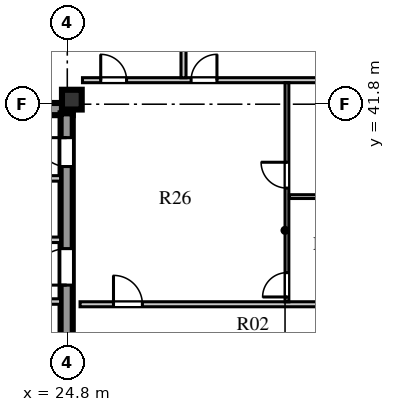
"""IFC4 building model, lengths in metres.
Left out: names, types, materials, properties, quantities, classifications, styles, units other than length and angle.
Written with IfcOpenShell. Run it as: python <this file> out.ifc"""

import sys

from ifc_helpers import new_model, si_unit, direction, frame, frame_2d, origin, origin_2d, place, context, subcontext, project, spatial, rectangle, extrude, element, fill, save


model = new_model("IFC4")
c1 = context("Model", 3, precision=1e-05, world=origin(), true_north=direction((0.0, 1.0)))
c2 = subcontext(c1, "Body", "Model", "MODEL_VIEW")
j1 = project(units=[si_unit("LENGTHUNIT", "METRE"), si_unit("PLANEANGLEUNIT", "RADIAN")], contexts=[c1])
p1 = place(None, origin())
s1 = spatial("IfcSite", under=j1, at=p1, CompositionType="ELEMENT")
p2 = place(p1, origin())
s2 = spatial("IfcBuilding", under=s1, at=p2, CompositionType="ELEMENT")
p3 = place(p2, frame((0.0, 0.0, 253.1)))
s3 = spatial("IfcBuildingStorey", under=s2, at=p3, CompositionType="ELEMENT", Elevation=253.1)
p4 = place(p3, frame((15.5, 41.64, 0.0), z_axis=(0.0, 0.0, 1.0), x_axis=(1.0, 0.0, 0.0)))
e1 = element("IfcWall", 1, at=p4, inside=s3, PredefinedType="SHEAR", context=c2, shape_type="SweptSolid", body=[
    extrude(rectangle(XDim=9.48, YDim=0.4, at=frame_2d((4.74, 0.0))), origin(), (0.0, 0.0, 1.0), 3.66),
])
p5 = place(p3, frame((24.78, 15.74, 0.0), z_axis=(0.0, 0.0, 1.0), x_axis=(0.0, 1.0, 0.0)))
e2 = element("IfcWall", 2, at=p5, inside=s3, PredefinedType="SHEAR", context=c2, shape_type="SweptSolid", body=[
    extrude(rectangle(XDim=25.76, YDim=0.4, at=frame_2d((12.88, 0.0))), origin(), (0.0, 0.0, 1.0), 3.66),
])
p6 = place(p5, frame((1.61, 0.0, 0.0)))
e3 = element("IfcOpeningElement", 3, at=p6, cuts=e2, PredefinedType="OPENING", context=c2, shape_type="SweptSolid", body=[
    extrude(rectangle(XDim=1.2, YDim=2.1, at=frame_2d((0.6, 1.05))), frame((0.0, 0.21, 0.0), z_axis=(0.0, -1.0, 0.0), x_axis=(1.0, 0.0, 0.0)), (0.0, 0.0, 1.0), 0.42),
])
p7 = place(p5, frame((6.78, 0.0, 0.0)))
e4 = element("IfcOpeningElement", 4, at=p7, cuts=e2, PredefinedType="OPENING", context=c2, shape_type="SweptSolid", body=[
    extrude(rectangle(XDim=0.85, YDim=2.06, at=frame_2d((0.425, 1.03))), frame((0.0, 0.21, 0.0), z_axis=(0.0, -1.0, 0.0), x_axis=(1.0, 0.0, 0.0)), (0.0, 0.0, 1.0), 0.42),
])
p8 = place(p5, frame((12.11, 0.0, 0.0)))
e5 = element("IfcOpeningElement", 5, at=p8, cuts=e2, PredefinedType="OPENING", context=c2, shape_type="SweptSolid", body=[
    extrude(rectangle(XDim=1.5, YDim=2.12, at=frame_2d((0.75, 1.06))), frame((0.0, 0.21, 0.0), z_axis=(0.0, -1.0, 0.0), x_axis=(1.0, 0.0, 0.0)), (0.0, 0.0, 1.0), 0.42),
])
p9 = place(p5, frame((20.11, 0.0, 0.0)))
e6 = element("IfcOpeningElement", 6, at=p9, cuts=e2, PredefinedType="OPENING", context=c2, shape_type="SweptSolid", body=[
    extrude(rectangle(XDim=1.2, YDim=2.12, at=frame_2d((0.6, 1.06))), frame((0.0, 0.21, 0.0), z_axis=(0.0, -1.0, 0.0), x_axis=(1.0, 0.0, 0.0)), (0.0, 0.0, 1.0), 0.42),
])
p10 = place(p5, frame((24.01, 0.0, 0.0)))
e7 = element("IfcOpeningElement", 7, at=p10, cuts=e2, PredefinedType="OPENING", context=c2, shape_type="SweptSolid", body=[
    extrude(rectangle(XDim=0.95, YDim=2.1, at=frame_2d((0.475, 1.05))), frame((0.0, 0.21, 0.0), z_axis=(0.0, -1.0, 0.0), x_axis=(1.0, 0.0, 0.0)), (0.0, 0.0, 1.0), 0.42),
])
p11 = place(p3, frame((24.95, 41.95, 0.0), z_axis=(0.0, 0.0, 1.0), x_axis=(1.0, 0.0, 0.0)))
e8 = element("IfcColumn", 8, at=p11, inside=s3, PredefinedType="COLUMN", context=c2, shape_type="SweptSolid", body=[
    extrude(rectangle(XDim=0.65, YDim=0.65, at=origin_2d()), origin(), (0.0, 0.0, 1.0), 3.66),
])
p12 = place(p3, frame((22.02, 35.31, 0.0), z_axis=(0.0, 0.0, 1.0), x_axis=(1.0, 0.0, 0.0)))
e9 = element("IfcWall", 9, at=p12, inside=s3, PredefinedType="SOLIDWALL", context=c2, shape_type="SweptSolid", body=[
    extrude(rectangle(XDim=2.56, YDim=0.18, at=frame_2d((1.28, 0.0))), origin(), (0.0, 0.0, 1.0), 3.66),
])
p13 = place(p12, frame((0.55, 0.0, 0.0)))
e10 = element("IfcOpeningElement", 10, at=p13, cuts=e9, PredefinedType="OPENING", context=c2, shape_type="SweptSolid", body=[
    extrude(rectangle(XDim=1.0, YDim=2.1, at=frame_2d((0.5, 1.05))), frame((0.0, 0.1, 0.0), z_axis=(0.0, -1.0, 0.0), x_axis=(1.0, 0.0, 0.0)), (0.0, 0.0, 1.0), 0.2),
])
p14 = place(p3, frame((19.64, 37.34, 0.0), z_axis=(0.0, 0.0, 1.0), x_axis=(1.0, 0.0, 0.0)))
e11 = element("IfcWall", 11, at=p14, inside=s3, PredefinedType="SOLIDWALL", context=c2, shape_type="SweptSolid", body=[
    extrude(rectangle(XDim=4.94, YDim=0.18, at=frame_2d((2.47, 0.0))), origin(), (0.0, 0.0, 1.0), 3.66),
])
p15 = place(p14, frame((0.45, 0.0, 0.0)))
e12 = element("IfcOpeningElement", 12, at=p15, cuts=e11, PredefinedType="OPENING", context=c2, shape_type="SweptSolid", body=[
    extrude(rectangle(XDim=1.0, YDim=2.1, at=frame_2d((0.5, 1.05))), frame((0.0, 0.1, 0.0), z_axis=(0.0, -1.0, 0.0), x_axis=(1.0, 0.0, 0.0)), (0.0, 0.0, 1.0), 0.2),
])
p16 = place(p14, frame((2.5, 0.0, 0.0)))
e13 = element("IfcOpeningElement", 13, at=p16, cuts=e11, PredefinedType="OPENING", context=c2, shape_type="SweptSolid", body=[
    extrude(rectangle(XDim=1.0, YDim=2.1, at=frame_2d((0.5, 1.05))), frame((0.0, 0.1, 0.0), z_axis=(0.0, -1.0, 0.0), x_axis=(1.0, 0.0, 0.0)), (0.0, 0.0, 1.0), 0.2),
])
p17 = place(p3, frame((19.64, 39.36, 0.0), z_axis=(0.0, 0.0, 1.0), x_axis=(1.0, 0.0, 0.0)))
e14 = element("IfcWall", 14, at=p17, inside=s3, PredefinedType="SOLIDWALL", context=c2, shape_type="SweptSolid", body=[
    extrude(rectangle(XDim=4.94, YDim=0.18, at=frame_2d((2.47, 0.0))), origin(), (0.0, 0.0, 1.0), 3.66),
])
p18 = place(p3, frame((25.22, 35.22, 0.0), z_axis=(0.0, 0.0, 1.0), x_axis=(1.0, 0.0, 0.0)))
e15 = element("IfcWall", 15, at=p18, inside=s3, PredefinedType="PARTITIONING", context=c2, shape_type="SweptSolid", body=[
    extrude(rectangle(XDim=9.5, YDim=0.165, at=frame_2d((4.75, 0.0))), origin(), (0.0, 0.0, 1.0), 3.66),
])
p19 = place(p18, frame((1.1, 0.0, 0.0)))
e16 = element("IfcOpeningElement", 16, at=p19, cuts=e15, PredefinedType="OPENING", context=c2, shape_type="SweptSolid", body=[
    extrude(rectangle(XDim=0.95, YDim=2.1, at=frame_2d((0.475, 1.05))), frame((0.0, 0.093, 0.0), z_axis=(0.0, -1.0, 0.0), x_axis=(1.0, 0.0, 0.0)), (0.0, 0.0, 1.0), 0.185),
])
p20 = place(p3, frame((25.3, 42.59, 0.0), z_axis=(0.0, 0.0, 1.0), x_axis=(1.0, 0.0, 0.0)))
e17 = element("IfcWall", 17, at=p20, inside=s3, PredefinedType="PARTITIONING", context=c2, shape_type="SweptSolid", body=[
    extrude(rectangle(XDim=9.34, YDim=0.165, at=frame_2d((4.67, 0.0))), origin(), (0.0, 0.0, 1.0), 3.66),
])
p21 = place(p20, frame((0.6, 0.0, 0.0)))
e18 = element("IfcOpeningElement", 18, at=p21, cuts=e17, PredefinedType="OPENING", context=c2, shape_type="SweptSolid", body=[
    extrude(rectangle(XDim=0.85, YDim=2.08, at=frame_2d((0.425, 1.04))), frame((0.0, 0.093, 0.0), z_axis=(0.0, -1.0, 0.0), x_axis=(1.0, 0.0, 0.0)), (0.0, 0.0, 1.0), 0.185),
])
p22 = place(p20, frame((3.573, 0.0, 0.0)))
e19 = element("IfcOpeningElement", 19, at=p22, cuts=e17, PredefinedType="OPENING", context=c2, shape_type="SweptSolid", body=[
    extrude(rectangle(XDim=0.85, YDim=2.08, at=frame_2d((0.425, 1.04))), frame((0.0, 0.093, 0.0), z_axis=(0.0, -1.0, 0.0), x_axis=(1.0, 0.0, 0.0)), (0.0, 0.0, 1.0), 0.185),
])
p23 = place(p3, frame((32.025, 35.3, 0.0), z_axis=(0.0, 0.0, 1.0), x_axis=(0.0, 1.0, 0.0)))
e20 = element("IfcWall", 20, at=p23, inside=s3, PredefinedType="PLUMBINGWALL", context=c2, shape_type="SweptSolid", body=[
    extrude(rectangle(XDim=7.21, YDim=0.125, at=frame_2d((3.605, 0.0))), origin(), (0.0, 0.0, 1.0), 3.66),
])
p24 = place(p23, frame((0.16, 0.0, 0.0)))
e21 = element("IfcOpeningElement", 21, at=p24, cuts=e20, PredefinedType="OPENING", context=c2, shape_type="SweptSolid", body=[
    extrude(rectangle(XDim=0.8, YDim=2.05, at=frame_2d((0.4, 1.025))), frame((0.0, 0.073, 0.0), z_axis=(0.0, -1.0, 0.0), x_axis=(1.0, 0.0, 0.0)), (0.0, 0.0, 1.0), 0.145),
])
p25 = place(p23, frame((3.741, 0.0, 0.0)))
e22 = element("IfcOpeningElement", 22, at=p25, cuts=e20, PredefinedType="OPENING", context=c2, shape_type="SweptSolid", body=[
    extrude(rectangle(XDim=0.85, YDim=2.08, at=frame_2d((0.425, 1.04))), frame((0.0, 0.073, 0.0), z_axis=(0.0, -1.0, 0.0), x_axis=(1.0, 0.0, 0.0)), (0.0, 0.0, 1.0), 0.145),
])
p26 = place(p3, frame((32.105, 38.761, 0.0), z_axis=(0.0, 0.0, 1.0), x_axis=(1.0, 0.0, 0.0)))
e23 = element("IfcWall", 23, at=p26, inside=s3, PredefinedType="PLUMBINGWALL", context=c2, shape_type="SweptSolid", body=[
    extrude(rectangle(XDim=2.535, YDim=0.125, at=frame_2d((1.268, 0.0))), origin(), (0.0, 0.0, 1.0), 3.66),
])
p27 = place(p3, frame((28.623, 42.67, 0.0), z_axis=(0.0, 0.0, 1.0), x_axis=(0.0, 1.0, 0.0)))
e24 = element("IfcWall", 24, at=p27, inside=s3, PredefinedType="PARTITIONING", context=c2, shape_type="SweptSolid", body=[
    extrude(rectangle(XDim=6.65, YDim=0.165, at=frame_2d((3.325, 0.0))), origin(), (0.0, 0.0, 1.0), 3.66),
])
p28 = place(p9, frame((1.2, 0.0, 0.0), z_axis=(0.0, 0.0, 1.0), x_axis=(-1.0, 0.0, 0.0)))
e25 = element("IfcDoor", 25, at=p28, inside=s3, OperationType="SINGLE_SWING_RIGHT", PredefinedType="DOOR", context=c2, shape_type="SweptSolid", body=[
    extrude(rectangle(XDim=1.2, YDim=2.12, at=frame_2d((0.6, 1.06))), frame((0.0, 0.025, 0.0), z_axis=(0.0, -1.0, 0.0), x_axis=(1.0, 0.0, 0.0)), (0.0, 0.0, 1.0), 0.05),
])
fill(e6, e25)
p29 = place(p10, frame((0.95, 0.0, 0.0), z_axis=(0.0, 0.0, 1.0), x_axis=(-1.0, 0.0, 0.0)))
e26 = element("IfcDoor", 26, at=p29, inside=s3, OperationType="SINGLE_SWING_LEFT", PredefinedType="DOOR", context=c2, shape_type="SweptSolid", body=[
    extrude(rectangle(XDim=0.95, YDim=2.1, at=frame_2d((0.475, 1.05))), frame((0.0, 0.025, 0.0), z_axis=(0.0, -1.0, 0.0), x_axis=(1.0, 0.0, 0.0)), (0.0, 0.0, 1.0), 0.05),
])
fill(e7, e26)
p30 = place(p24, origin())
e27 = element("IfcDoor", 27, at=p30, inside=s3, OperationType="SINGLE_SWING_LEFT", PredefinedType="DOOR", context=c2, shape_type="SweptSolid", body=[
    extrude(rectangle(XDim=0.8, YDim=2.05, at=frame_2d((0.4, 1.025))), frame((0.0, 0.025, 0.0), z_axis=(0.0, -1.0, 0.0), x_axis=(1.0, 0.0, 0.0)), (0.0, 0.0, 1.0), 0.05),
])
fill(e21, e27)
p31 = place(p25, origin())
e28 = element("IfcDoor", 28, at=p31, inside=s3, OperationType="SINGLE_SWING_RIGHT", PredefinedType="DOOR", context=c2, shape_type="SweptSolid", body=[
    extrude(rectangle(XDim=0.85, YDim=2.08, at=frame_2d((0.425, 1.04))), frame((0.0, 0.025, 0.0), z_axis=(0.0, -1.0, 0.0), x_axis=(1.0, 0.0, 0.0)), (0.0, 0.0, 1.0), 0.05),
])
fill(e22, e28)
p32 = place(p21, origin())
e29 = element("IfcDoor", 29, at=p32, inside=s3, OperationType="SINGLE_SWING_LEFT", PredefinedType="DOOR", context=c2, shape_type="SweptSolid", body=[
    extrude(rectangle(XDim=0.85, YDim=2.08, at=frame_2d((0.425, 1.04))), frame((0.0, 0.025, 0.0), z_axis=(0.0, -1.0, 0.0), x_axis=(1.0, 0.0, 0.0)), (0.0, 0.0, 1.0), 0.05),
])
fill(e18, e29)
p33 = place(p22, origin())
e30 = element("IfcDoor", 30, at=p33, inside=s3, OperationType="SINGLE_SWING_RIGHT", PredefinedType="DOOR", context=c2, shape_type="SweptSolid", body=[
    extrude(rectangle(XDim=0.85, YDim=2.08, at=frame_2d((0.425, 1.04))), frame((0.0, 0.025, 0.0), z_axis=(0.0, -1.0, 0.0), x_axis=(1.0, 0.0, 0.0)), (0.0, 0.0, 1.0), 0.05),
])
fill(e19, e30)
p34 = place(p19, origin())
e31 = element("IfcDoor", 31, at=p34, inside=s3, OperationType="SINGLE_SWING_LEFT", PredefinedType="DOOR", context=c2, shape_type="SweptSolid", body=[
    extrude(rectangle(XDim=0.95, YDim=2.1, at=frame_2d((0.475, 1.05))), frame((0.0, 0.025, 0.0), z_axis=(0.0, -1.0, 0.0), x_axis=(1.0, 0.0, 0.0)), (0.0, 0.0, 1.0), 0.05),
])
fill(e16, e31)
save(model, sys.argv[1])
